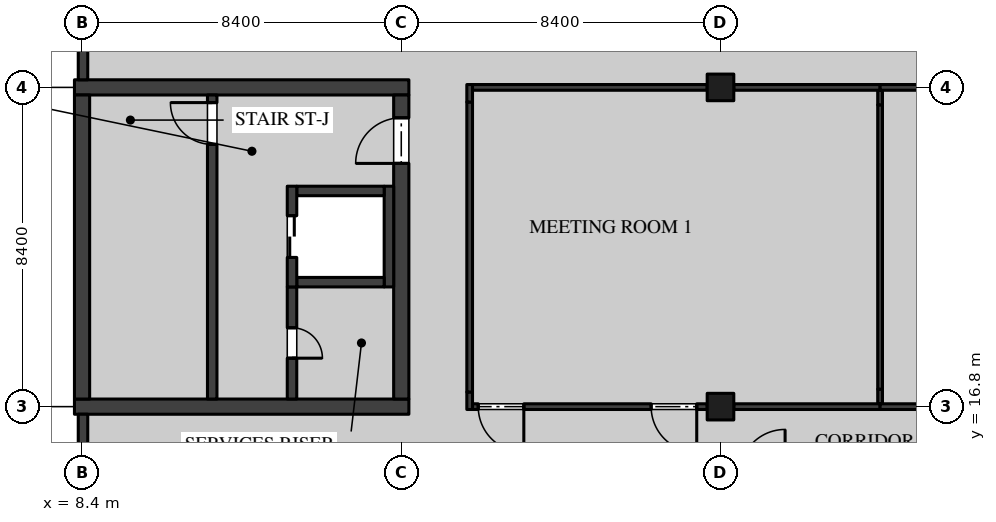
"""IFC4 building model, lengths in metres.
Left out: names, types, materials, properties, quantities, classifications, styles, units other than length and angle.
Written with IfcOpenShell. Run it as: python <this file> out.ifc"""

import sys

from ifc_helpers import new_model, si_unit, direction, frame, frame_2d, origin, origin_2d, place, context, subcontext, project, spatial, rectangle, extrude, element, fill, save


model = new_model("IFC4")
c1 = context("Model", 3, precision=1e-05, world=origin(), true_north=direction((0.0, 1.0)))
c2 = subcontext(c1, "Body", "Model", "MODEL_VIEW")
j1 = project(units=[si_unit("LENGTHUNIT", "METRE"), si_unit("PLANEANGLEUNIT", "RADIAN")], contexts=[c1])
p1 = place(None, origin())
s1 = spatial("IfcSite", under=j1, at=p1, CompositionType="ELEMENT")
p2 = place(p1, origin())
s2 = spatial("IfcBuilding", under=s1, at=p2, CompositionType="ELEMENT")
p3 = place(p2, frame((0.0, 0.0, 5.4)))
s3 = spatial("IfcBuildingStorey", under=s2, at=p3, CompositionType="ELEMENT", Elevation=5.4)
for number, where, z_axis, x_axis in (
    (1, (25.2, 16.8, 0.0), (0.0, 0.0, 1.0), (1.0, 0.0, 0.0)),
    (2, (25.2, 25.2, 0.0), (0.0, 0.0, 1.0), (1.0, 0.0, 0.0)),
):
    element("IfcColumn", number, at=place(p3, frame(where, z_axis=z_axis, x_axis=x_axis)), inside=s3, PredefinedType="COLUMN", context=c2, shape_type="SweptSolid", body=[
        extrude(rectangle(XDim=0.7, YDim=0.7, at=origin_2d()), origin(), (0.0, 0.0, 1.0), 4.37),
    ])
for number, where, z_axis, x_axis in (
    (3, (8.2, 16.8, 0.0), (0.0, 0.0, 1.0), (1.0, 0.0, 0.0)),
    (4, (8.2, 25.2, 0.0), (0.0, 0.0, 1.0), (1.0, 0.0, 0.0)),
):
    element("IfcWall", number, at=place(p3, frame(where, z_axis=z_axis, x_axis=x_axis)), inside=s3, PredefinedType="SHEAR", context=c2, shape_type="SweptSolid", body=[
        extrude(rectangle(XDim=8.8, YDim=0.4, at=frame_2d((4.4, 0.0))), origin(), (0.0, 0.0, 1.0), 4.37),
    ])
p4 = place(p3, frame((8.4, 17.0, 0.0), z_axis=(0.0, 0.0, 1.0), x_axis=(0.0, 1.0, 0.0)))
e5 = element("IfcWall", 5, at=p4, inside=s3, PredefinedType="SHEAR", context=c2, shape_type="SweptSolid", body=[
    extrude(rectangle(XDim=8.0, YDim=0.4, at=frame_2d((4.0, 0.0))), origin(), (0.0, 0.0, 1.0), 4.37),
])
p5 = place(p3, frame((16.8, 17.0, 0.0), z_axis=(0.0, 0.0, 1.0), x_axis=(0.0, 1.0, 0.0)))
e6 = element("IfcWall", 6, at=p5, inside=s3, PredefinedType="SHEAR", context=c2, shape_type="SweptSolid", body=[
    extrude(rectangle(XDim=8.0, YDim=0.4, at=frame_2d((4.0, 0.0))), origin(), (0.0, 0.0, 1.0), 4.37),
])
p6 = place(p5, frame((6.2, 0.0, 0.0)))
e7 = element("IfcOpeningElement", 7, at=p6, cuts=e6, PredefinedType="OPENING", context=c2, shape_type="SweptSolid", body=[
    extrude(rectangle(XDim=1.2, YDim=2.1, at=frame_2d((0.6, 1.05))), frame((0.0, 0.21, 0.0), z_axis=(0.0, -1.0, 0.0), x_axis=(1.0, 0.0, 0.0)), (0.0, 0.0, 1.0), 0.42),
])
p7 = place(p3, frame((11.825, 25.0, 0.0), z_axis=(0.0, 0.0, 1.0), x_axis=(0.0, -1.0, 0.0)))
e8 = element("IfcWall", 8, at=p7, inside=s3, PredefinedType="SOLIDWALL", context=c2, shape_type="SweptSolid", body=[
    extrude(rectangle(XDim=8.0, YDim=0.25, at=frame_2d((4.0, 0.0))), origin(), (0.0, 0.0, 1.0), 4.37),
])
p8 = place(p7, frame((0.2, 0.0, 0.0)))
e9 = element("IfcOpeningElement", 9, at=p8, cuts=e8, PredefinedType="OPENING", context=c2, shape_type="SweptSolid", body=[
    extrude(rectangle(XDim=1.1, YDim=2.1, at=frame_2d((0.55, 1.05))), frame((0.0, 0.135, 0.0), z_axis=(0.0, -1.0, 0.0), x_axis=(1.0, 0.0, 0.0)), (0.0, 0.0, 1.0), 0.27),
])
p9 = place(p3, frame((13.925, 19.95, 0.0), z_axis=(0.0, 0.0, 1.0), x_axis=(0.0, -1.0, 0.0)))
e10 = element("IfcWall", 10, at=p9, inside=s3, PredefinedType="SOLIDWALL", context=c2, shape_type="SweptSolid", body=[
    extrude(rectangle(XDim=2.95, YDim=0.25, at=frame_2d((1.475, 0.0))), origin(), (0.0, 0.0, 1.0), 4.37),
])
p10 = place(p9, frame((1.075, 0.0, 0.0)))
e11 = element("IfcOpeningElement", 11, at=p10, cuts=e10, PredefinedType="OPENING", context=c2, shape_type="SweptSolid", body=[
    extrude(rectangle(XDim=0.8, YDim=2.1, at=frame_2d((0.4, 1.05))), frame((0.0, 0.135, 0.0), z_axis=(0.0, -1.0, 0.0), x_axis=(1.0, 0.0, 0.0)), (0.0, 0.0, 1.0), 0.27),
])
p11 = place(p3, frame((16.475, 19.95, 0.0), z_axis=(0.0, 0.0, 1.0), x_axis=(0.0, 1.0, 0.0)))
e12 = element("IfcWall", 12, at=p11, inside=s3, PredefinedType="SOLIDWALL", context=c2, shape_type="SweptSolid", body=[
    extrude(rectangle(XDim=2.65, YDim=0.25, at=frame_2d((1.325, 0.0))), origin(), (0.0, 0.0, 1.0), 4.37),
])
for number, where, z_axis, x_axis in (
    (13, (14.05, 22.475, 0.0), (0.0, 0.0, 1.0), (1.0, 0.0, 0.0)),
    (14, (14.05, 20.075, 0.0), (0.0, 0.0, 1.0), (1.0, 0.0, 0.0)),
):
    element("IfcWall", number, at=place(p3, frame(where, z_axis=z_axis, x_axis=x_axis)), inside=s3, PredefinedType="SOLIDWALL", context=c2, shape_type="SweptSolid", body=[
        extrude(rectangle(XDim=2.3, YDim=0.25, at=frame_2d((1.15, 0.0))), origin(), (0.0, 0.0, 1.0), 4.37),
    ])
p12 = place(p3, frame((13.925, 19.95, 0.0), z_axis=(0.0, 0.0, 1.0), x_axis=(0.0, 1.0, 0.0)))
e15 = element("IfcWall", 15, at=p12, inside=s3, PredefinedType="SOLIDWALL", context=c2, shape_type="SweptSolid", body=[
    extrude(rectangle(XDim=2.65, YDim=0.25, at=frame_2d((1.325, 0.0))), origin(), (0.0, 0.0, 1.0), 4.37),
])
p13 = place(p12, frame((0.775, 0.0, 0.0)))
e16 = element("IfcOpeningElement", 16, at=p13, cuts=e15, PredefinedType="OPENING", context=c2, shape_type="SweptSolid", body=[
    extrude(rectangle(XDim=1.1, YDim=2.1, at=frame_2d((0.55, 1.05))), frame((0.0, 0.135, 0.0), z_axis=(0.0, -1.0, 0.0), x_axis=(1.0, 0.0, 0.0)), (0.0, 0.0, 1.0), 0.27),
])
p14 = place(p3, frame((29.4, 16.875, 0.0), z_axis=(0.0, 0.0, 1.0), x_axis=(0.0, 1.0, 0.0)))
e17 = element("IfcWall", 17, at=p14, inside=s3, PredefinedType="PARTITIONING", context=c2, shape_type="SweptSolid", body=[
    extrude(rectangle(XDim=0.385, YDim=0.125, at=frame_2d((0.192, 0.0))), origin(), (0.0, 0.0, 1.0), 3.746),
])
p15 = place(p3, frame((29.4, 17.26, 0.0), z_axis=(0.0, 0.0, 1.0), x_axis=(0.0, 1.0, 0.0)))
e18 = element("IfcWall", 18, at=p15, inside=s3, PredefinedType="PARTITIONING", context=c2, shape_type="SweptSolid", body=[
    extrude(rectangle(XDim=7.48, YDim=0.125, at=frame_2d((3.74, 0.0))), origin(), (0.0, 0.0, 1.0), 4.37),
])
p16 = place(p3, frame((29.4, 24.74, 0.0), z_axis=(0.0, 0.0, 1.0), x_axis=(0.0, 1.0, 0.0)))
e19 = element("IfcWall", 19, at=p16, inside=s3, PredefinedType="PARTITIONING", context=c2, shape_type="SweptSolid", body=[
    extrude(rectangle(XDim=0.385, YDim=0.125, at=frame_2d((0.192, 0.0))), origin(), (0.0, 0.0, 1.0), 3.746),
])
p17 = place(p3, frame((18.6, 16.725, 0.0), z_axis=(0.0, 0.0, 1.0), x_axis=(0.0, 1.0, 0.0)))
e20 = element("IfcWall", 20, at=p17, inside=s3, PredefinedType="PARTITIONING", context=c2, shape_type="SweptSolid", body=[
    extrude(rectangle(XDim=0.46, YDim=0.15, at=frame_2d((0.23, 0.0))), origin(), (0.0, 0.0, 1.0), 3.746),
])
p18 = place(p3, frame((18.6, 17.185, 0.0), z_axis=(0.0, 0.0, 1.0), x_axis=(0.0, 1.0, 0.0)))
e21 = element("IfcWall", 21, at=p18, inside=s3, PredefinedType="PARTITIONING", context=c2, shape_type="SweptSolid", body=[
    extrude(rectangle(XDim=7.63, YDim=0.15, at=frame_2d((3.815, 0.0))), origin(), (0.0, 0.0, 1.0), 4.37),
])
p19 = place(p3, frame((18.6, 24.815, 0.0), z_axis=(0.0, 0.0, 1.0), x_axis=(0.0, 1.0, 0.0)))
e22 = element("IfcWall", 22, at=p19, inside=s3, PredefinedType="PARTITIONING", context=c2, shape_type="SweptSolid", body=[
    extrude(rectangle(XDim=0.46, YDim=0.15, at=frame_2d((0.23, 0.0))), origin(), (0.0, 0.0, 1.0), 3.746),
])
p20 = place(p3, frame((18.675, 16.8, 0.0), z_axis=(0.0, 0.0, 1.0), x_axis=(1.0, 0.0, 0.0)))
e23 = element("IfcWall", 23, at=p20, inside=s3, PredefinedType="PARTITIONING", context=c2, shape_type="SweptSolid", body=[
    extrude(rectangle(XDim=6.175, YDim=0.15, at=frame_2d((3.087, 0.0))), origin(), (0.0, 0.0, 1.0), 3.746),
])
p21 = place(p20, frame((0.15, 0.0, 0.0)))
e24 = element("IfcOpeningElement", 24, at=p21, cuts=e23, PredefinedType="OPENING", context=c2, shape_type="SweptSolid", body=[
    extrude(rectangle(XDim=1.2, YDim=2.4, at=frame_2d((0.6, 1.2))), frame((0.0, 0.085, 0.0), z_axis=(0.0, -1.0, 0.0), x_axis=(1.0, 0.0, 0.0)), (0.0, 0.0, 1.0), 0.17),
])
p22 = place(p20, frame((4.7, 0.0, 0.0)))
e25 = element("IfcOpeningElement", 25, at=p22, cuts=e23, PredefinedType="OPENING", context=c2, shape_type="SweptSolid", body=[
    extrude(rectangle(XDim=1.2, YDim=2.4, at=frame_2d((0.6, 1.2))), frame((0.0, 0.085, 0.0), z_axis=(0.0, -1.0, 0.0), x_axis=(1.0, 0.0, 0.0)), (0.0, 0.0, 1.0), 0.17),
])
p23 = place(p3, frame((25.55, 16.8, 0.0), z_axis=(0.0, 0.0, 1.0), x_axis=(1.0, 0.0, 0.0)))
e26 = element("IfcWall", 26, at=p23, inside=s3, PredefinedType="PARTITIONING", context=c2, shape_type="SweptSolid", body=[
    extrude(rectangle(XDim=3.85, YDim=0.15, at=frame_2d((1.925, 0.0))), origin(), (0.0, 0.0, 1.0), 3.746),
])
p24 = place(p3, frame((18.675, 25.2, 0.0), z_axis=(0.0, 0.0, 1.0), x_axis=(1.0, 0.0, 0.0)))
e27 = element("IfcWall", 27, at=p24, inside=s3, PredefinedType="PARTITIONING", context=c2, shape_type="SweptSolid", body=[
    extrude(rectangle(XDim=6.175, YDim=0.15, at=frame_2d((3.087, 0.0))), origin(), (0.0, 0.0, 1.0), 3.746),
])
p25 = place(p3, frame((25.55, 25.2, 0.0), z_axis=(0.0, 0.0, 1.0), x_axis=(1.0, 0.0, 0.0)))
e28 = element("IfcWall", 28, at=p25, inside=s3, PredefinedType="PARTITIONING", context=c2, shape_type="SweptSolid", body=[
    extrude(rectangle(XDim=3.85, YDim=0.15, at=frame_2d((1.925, 0.0))), origin(), (0.0, 0.0, 1.0), 3.746),
])
for number, where, z_axis, x_axis in (
    (29, (29.4, 16.8, 0.0), (0.0, 0.0, 1.0), (1.0, 0.0, 0.0)),
    (30, (29.4, 25.2, 0.0), (0.0, 0.0, 1.0), (1.0, 0.0, 0.0)),
):
    element("IfcWall", number, at=place(p3, frame(where, z_axis=z_axis, x_axis=x_axis)), inside=s3, PredefinedType="PARTITIONING", context=c2, shape_type="SweptSolid", body=[
        extrude(rectangle(XDim=3.85, YDim=0.15, at=frame_2d((1.925, 0.0))), origin(), (0.0, 0.0, 1.0), 3.746),
    ])
p26 = place(p3, frame((8.425, 33.22, 0.0), z_axis=(0.0, 0.0, 1.0), x_axis=(0.0, -1.0, 0.0)))
e31 = element("IfcWall", 31, at=p26, inside=s3, PredefinedType="SOLIDWALL", context=c2, shape_type="SweptSolid", body=[
    extrude(rectangle(XDim=7.82, YDim=0.25, at=frame_2d((3.91, 0.0))), origin(), (0.0, 0.0, 1.0), 3.746),
])
p27 = place(p26, frame((0.82, 0.0, 0.9)))
e32 = element("IfcOpeningElement", 32, at=p27, cuts=e31, PredefinedType="OPENING", context=c2, shape_type="SweptSolid", body=[
    extrude(rectangle(XDim=1.8, YDim=2.1, at=frame_2d((0.9, 1.05))), frame((0.0, 0.135, 0.0), z_axis=(0.0, -1.0, 0.0), x_axis=(1.0, 0.0, 0.0)), (0.0, 0.0, 1.0), 0.27),
])
p28 = place(p3, frame((8.425, 16.6, 0.0), z_axis=(0.0, 0.0, 1.0), x_axis=(0.0, -1.0, 0.0)))
e33 = element("IfcWall", 33, at=p28, inside=s3, PredefinedType="SOLIDWALL", context=c2, shape_type="SweptSolid", body=[
    extrude(rectangle(XDim=7.87, YDim=0.25, at=frame_2d((3.935, 0.0))), origin(), (0.0, 0.0, 1.0), 3.746),
])
p29 = place(p6, origin())
e34 = element("IfcDoor", 34, at=p29, inside=s3, OperationType="SINGLE_SWING_RIGHT", PredefinedType="DOOR", context=c2, shape_type="SweptSolid", body=[
    extrude(rectangle(XDim=1.2, YDim=2.1, at=frame_2d((0.6, 1.05))), frame((0.0, 0.035, 0.0), z_axis=(0.0, -1.0, 0.0), x_axis=(1.0, 0.0, 0.0)), (0.0, 0.0, 1.0), 0.07),
])
fill(e7, e34)
p30 = place(p10, origin())
e35 = element("IfcDoor", 35, at=p30, inside=s3, OperationType="SINGLE_SWING_LEFT", PredefinedType="DOOR", context=c2, shape_type="SweptSolid", body=[
    extrude(rectangle(XDim=0.8, YDim=2.1, at=frame_2d((0.4, 1.05))), frame((0.0, 0.035, 0.0), z_axis=(0.0, -1.0, 0.0), x_axis=(1.0, 0.0, 0.0)), (0.0, 0.0, 1.0), 0.07),
])
fill(e11, e35)
p31 = place(p8, frame((1.1, 0.0, 0.0), z_axis=(0.0, 0.0, 1.0), x_axis=(-1.0, 0.0, 0.0)))
e36 = element("IfcDoor", 36, at=p31, inside=s3, OperationType="SINGLE_SWING_LEFT", PredefinedType="DOOR", context=c2, shape_type="SweptSolid", body=[
    extrude(rectangle(XDim=1.1, YDim=2.1, at=frame_2d((0.55, 1.05))), frame((0.0, 0.035, 0.0), z_axis=(0.0, -1.0, 0.0), x_axis=(1.0, 0.0, 0.0)), (0.0, 0.0, 1.0), 0.07),
])
fill(e9, e36)
p32 = place(p13, origin())
e37 = element("IfcDoor", 37, at=p32, inside=s3, OperationType="DOUBLE_DOOR_SLIDING", PredefinedType="DOOR", context=c2, shape_type="SweptSolid", body=[
    extrude(rectangle(XDim=1.1, YDim=2.1, at=frame_2d((0.55, 1.05))), frame((0.0, 0.04, 0.0), z_axis=(0.0, -1.0, 0.0), x_axis=(1.0, 0.0, 0.0)), (0.0, 0.0, 1.0), 0.08),
])
fill(e16, e37)
p33 = place(p21, frame((1.2, 0.0, 0.0), z_axis=(0.0, 0.0, 1.0), x_axis=(-1.0, 0.0, 0.0)))
e38 = element("IfcDoor", 38, at=p33, inside=s3, OperationType="SINGLE_SWING_RIGHT", PredefinedType="DOOR", context=c2, shape_type="SweptSolid", body=[
    extrude(rectangle(XDim=1.2, YDim=2.4, at=frame_2d((0.6, 1.2))), frame((0.0, 0.025, 0.0), z_axis=(0.0, -1.0, 0.0), x_axis=(1.0, 0.0, 0.0)), (0.0, 0.0, 1.0), 0.05),
])
fill(e24, e38)
p34 = place(p22, frame((1.2, 0.0, 0.0), z_axis=(0.0, 0.0, 1.0), x_axis=(-1.0, 0.0, 0.0)))
e39 = element("IfcDoor", 39, at=p34, inside=s3, OperationType="SINGLE_SWING_RIGHT", PredefinedType="DOOR", context=c2, shape_type="SweptSolid", body=[
    extrude(rectangle(XDim=1.2, YDim=2.4, at=frame_2d((0.6, 1.2))), frame((0.0, 0.025, 0.0), z_axis=(0.0, -1.0, 0.0), x_axis=(1.0, 0.0, 0.0)), (0.0, 0.0, 1.0), 0.05),
])
fill(e25, e39)
save(model, sys.argv[1])
